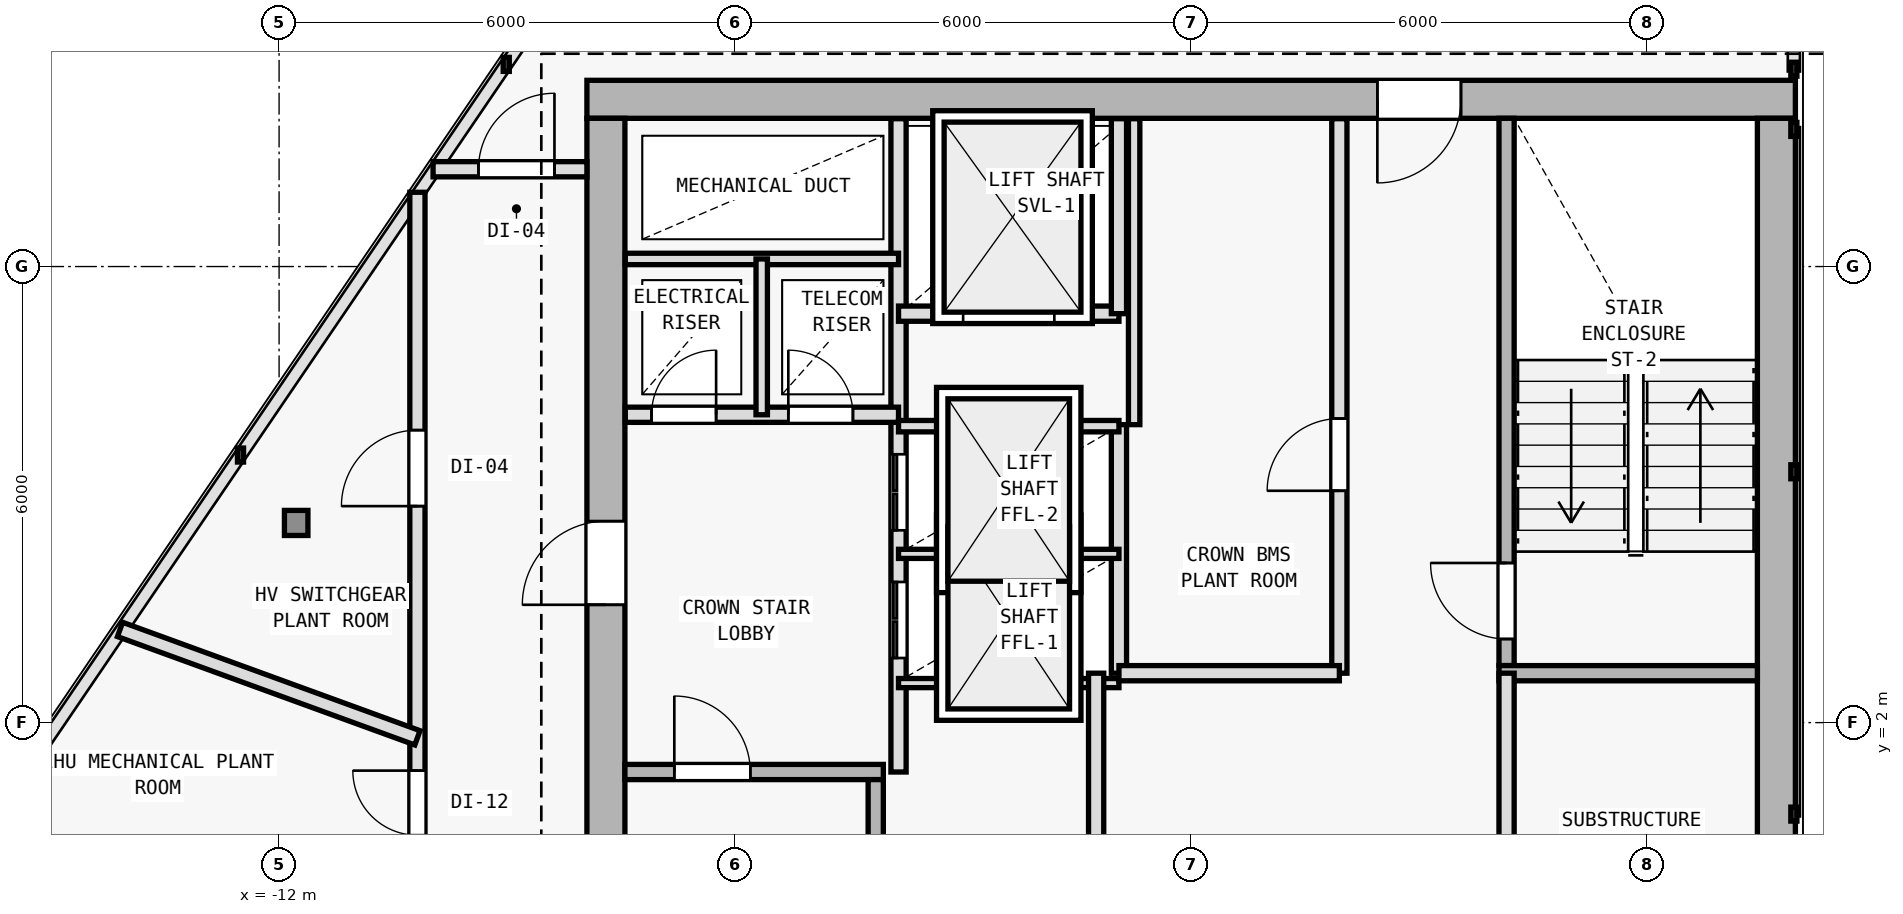
"""IFC4 building model, lengths in metres.
Left out: names, types, materials, properties, quantities, classifications, styles, units other than length and angle.
Written with IfcOpenShell. Run it as: python <this file> out.ifc"""

import sys

from ifc_helpers import new_model, si_unit, direction, frame, frame_2d, origin, origin_2d, place, context, subcontext, project, spatial, rectangle, i_section, extrude, element, fill, save


model = new_model("IFC4")
c1 = context("Model", 3, precision=1e-05, world=origin(), true_north=direction((0.0, 1.0)))
c2 = subcontext(c1, "Body", "Model", "MODEL_VIEW")
j1 = project(units=[si_unit("LENGTHUNIT", "METRE"), si_unit("PLANEANGLEUNIT", "RADIAN")], contexts=[c1])
p1 = place(None, origin())
s1 = spatial("IfcSite", under=j1, at=p1, CompositionType="ELEMENT")
p2 = place(p1, origin())
s2 = spatial("IfcBuilding", under=s1, at=p2, CompositionType="ELEMENT")
p3 = place(p2, frame((0.0, 0.0, 304.8)))
s3 = spatial("IfcBuildingStorey", under=s2, at=p3, CompositionType="ELEMENT", Elevation=304.8)
for number, where, z_axis, x_axis in (
    (1, (7.7, 10.2, 0.0), (0.0, 0.0, 1.0), (1.0, 0.0, 0.0)),
    (2, (-7.7, 10.2, 0.0), (0.0, 0.0, 1.0), (1.0, 0.0, 0.0)),
    (3, (7.7, 0.4, 0.0), (0.0, 0.0, 1.0), (1.0, 0.0, 0.0)),
    (4, (-7.7, 2.0, 0.0), (0.0, 0.0, 1.0), (1.0, 0.0, 0.0)),
):
    element("IfcColumn", number, at=place(p3, frame(where, z_axis=z_axis, x_axis=x_axis)), inside=s3, PredefinedType="COLUMN", context=c2, shape_type="SweptSolid", body=[
        extrude(i_section(OverallWidth=0.374, OverallDepth=0.372, WebThickness=0.012, FlangeThickness=0.02, FilletRadius=0.015, at=origin_2d()), origin(), (0.0, 0.0, 1.0), 3.6),
    ])
p4 = place(p3, frame((-11.775, 4.627, 0.0), z_axis=(0.0, 0.0, 1.0), x_axis=(1.0, 0.0, 0.0)))
e5 = element("IfcColumn", 5, at=p4, inside=s3, PredefinedType="COLUMN", context=c2, shape_type="SweptSolid", body=[
    extrude(i_section(OverallWidth=0.309, OverallDepth=0.33, WebThickness=0.011, FlangeThickness=0.019, FilletRadius=0.027, at=origin_2d()), origin(), (0.0, 0.0, 1.0), 3.6),
])
p5 = place(p3, frame((7.95, 10.2, 0.0), z_axis=(0.0, 0.0, 1.0), x_axis=(-1.0, 0.0, 0.0)))
e6 = element("IfcWall", 6, at=p5, inside=s3, PredefinedType="SHEAR", context=c2, shape_type="SweptSolid", body=[
    extrude(rectangle(XDim=15.9, YDim=0.5, at=frame_2d((7.95, 0.0))), origin(), (0.0, 0.0, 1.0), 3.34),
])
p6 = place(p5, frame((4.4, 0.0, 0.0)))
e7 = element("IfcOpeningElement", 7, at=p6, cuts=e6, PredefinedType="OPENING", context=c2, shape_type="SweptSolid", body=[
    extrude(rectangle(XDim=1.1, YDim=2.15, at=frame_2d((0.55, 1.075))), frame((0.0, 0.26, 0.0), z_axis=(0.0, -1.0, 0.0), x_axis=(1.0, 0.0, 0.0)), (0.0, 0.0, 1.0), 0.52),
])
p7 = place(p3, frame((-7.7, -9.15, 0.0), z_axis=(0.0, 0.0, 1.0), x_axis=(0.0, 1.0, 0.0)))
e8 = element("IfcWall", 8, at=p7, inside=s3, PredefinedType="SHEAR", context=c2, shape_type="SweptSolid", body=[
    extrude(rectangle(XDim=19.1, YDim=0.5, at=frame_2d((9.55, 0.0))), origin(), (0.0, 0.0, 1.0), 3.34),
])
p8 = place(p7, frame((12.7, 0.0, 0.0)))
e9 = element("IfcOpeningElement", 9, at=p8, cuts=e8, PredefinedType="OPENING", context=c2, shape_type="SweptSolid", body=[
    extrude(rectangle(XDim=1.1, YDim=2.15, at=frame_2d((0.55, 1.075))), frame((0.0, 0.26, 0.0), z_axis=(0.0, -1.0, 0.0), x_axis=(1.0, 0.0, 0.0)), (0.0, 0.0, 1.0), 0.52),
])
p9 = place(p3, frame((7.7, 9.95, 0.0), z_axis=(0.0, 0.0, 1.0), x_axis=(0.0, -1.0, 0.0)))
e10 = element("IfcWall", 10, at=p9, inside=s3, PredefinedType="SHEAR", context=c2, shape_type="SweptSolid", body=[
    extrude(rectangle(XDim=19.1, YDim=0.5, at=frame_2d((9.55, 0.0))), origin(), (0.0, 0.0, 1.0), 3.34),
])
p10 = place(p3, frame((-7.45, 1.35, 0.0), z_axis=(0.0, 0.0, 1.0), x_axis=(1.0, 0.0, 0.0)))
e11 = element("IfcWall", 11, at=p10, inside=s3, PredefinedType="SOLIDWALL", context=c2, shape_type="SweptSolid", body=[
    extrude(rectangle(XDim=3.4, YDim=0.2, at=frame_2d((1.7, 0.0))), origin(), (0.0, 0.0, 1.0), 3.34),
])
p11 = place(p10, frame((0.65, 0.0, 0.0)))
e12 = element("IfcOpeningElement", 12, at=p11, cuts=e11, PredefinedType="OPENING", context=c2, shape_type="SweptSolid", body=[
    extrude(rectangle(XDim=1.0, YDim=2.15, at=frame_2d((0.5, 1.075))), frame((0.0, 0.11, 0.0), z_axis=(0.0, -1.0, 0.0), x_axis=(1.0, 0.0, 0.0)), (0.0, 0.0, 1.0), 0.22),
])
p12 = place(p3, frame((-4.15, -5.95, 0.0), z_axis=(0.0, 0.0, 1.0), x_axis=(0.0, 1.0, 0.0)))
e13 = element("IfcWall", 13, at=p12, inside=s3, PredefinedType="SOLIDWALL", context=c2, shape_type="SweptSolid", body=[
    extrude(rectangle(XDim=7.2, YDim=0.2, at=frame_2d((3.6, 0.0))), origin(), (0.0, 0.0, 1.0), 3.34),
])
p13 = place(p3, frame((-3.85, 1.35, 0.0), z_axis=(0.0, 0.0, 1.0), x_axis=(0.0, 1.0, 0.0)))
e14 = element("IfcWall", 14, at=p13, inside=s3, PredefinedType="SOLIDWALL", context=c2, shape_type="SweptSolid", body=[
    extrude(rectangle(XDim=8.595, YDim=0.2, at=frame_2d((4.297, 0.0))), origin(), (0.0, 0.0, 1.0), 3.34),
])
p14 = place(p13, frame((1.5, 0.0, 0.0)))
e15 = element("IfcOpeningElement", 15, at=p14, cuts=e14, PredefinedType="OPENING", context=c2, shape_type="SweptSolid", body=[
    extrude(rectangle(XDim=1.0, YDim=2.15, at=frame_2d((0.5, 1.075))), frame((0.0, 0.11, 0.0), z_axis=(0.0, -1.0, 0.0), x_axis=(1.0, 0.0, 0.0)), (0.0, 0.0, 1.0), 0.22),
])
p15 = place(p13, frame((3.18, 0.0, 0.0)))
e16 = element("IfcOpeningElement", 16, at=p15, cuts=e14, PredefinedType="OPENING", context=c2, shape_type="SweptSolid", body=[
    extrude(rectangle(XDim=1.0, YDim=2.15, at=frame_2d((0.5, 1.075))), frame((0.0, 0.11, 0.0), z_axis=(0.0, -1.0, 0.0), x_axis=(1.0, 0.0, 0.0)), (0.0, 0.0, 1.0), 0.22),
])
p16 = place(p3, frame((-7.445, 6.05, 0.0), z_axis=(0.0, 0.0, 1.0), x_axis=(1.0, 0.0, 0.0)))
e17 = element("IfcWall", 17, at=p16, inside=s3, PredefinedType="SOLIDWALL", context=c2, shape_type="SweptSolid", body=[
    extrude(rectangle(XDim=3.595, YDim=0.2, at=frame_2d((1.797, 0.0))), origin(), (0.0, 0.0, 1.0), 3.34),
])
p17 = place(p16, frame((0.345, 0.0, 0.0)))
e18 = element("IfcOpeningElement", 18, at=p17, cuts=e17, PredefinedType="OPENING", context=c2, shape_type="SweptSolid", body=[
    extrude(rectangle(XDim=0.85, YDim=2.1, at=frame_2d((0.425, 1.05))), frame((0.0, 0.11, 0.0), z_axis=(0.0, -1.0, 0.0), x_axis=(1.0, 0.0, 0.0)), (0.0, 0.0, 1.0), 0.22),
])
p18 = place(p16, frame((2.145, 0.0, 0.0)))
e19 = element("IfcOpeningElement", 19, at=p18, cuts=e17, PredefinedType="OPENING", context=c2, shape_type="SweptSolid", body=[
    extrude(rectangle(XDim=0.85, YDim=2.1, at=frame_2d((0.425, 1.05))), frame((0.0, 0.11, 0.0), z_axis=(0.0, -1.0, 0.0), x_axis=(1.0, 0.0, 0.0)), (0.0, 0.0, 1.0), 0.22),
])
p19 = place(p3, frame((-7.445, 8.1, 0.0), z_axis=(0.0, 0.0, 1.0), x_axis=(1.0, 0.0, 0.0)))
e20 = element("IfcWall", 20, at=p19, inside=s3, PredefinedType="PARTITIONING", context=c2, shape_type="SweptSolid", body=[
    extrude(rectangle(XDim=3.595, YDim=0.15, at=frame_2d((1.797, 0.0))), origin(), (0.0, 0.0, 1.0), 3.34),
])
p20 = place(p3, frame((-5.65, 6.05, 0.0), z_axis=(0.0, 0.0, 1.0), x_axis=(0.0, 1.0, 0.0)))
e21 = element("IfcWall", 21, at=p20, inside=s3, PredefinedType="PARTITIONING", context=c2, shape_type="SweptSolid", body=[
    extrude(rectangle(XDim=2.05, YDim=0.15, at=frame_2d((1.025, 0.0))), origin(), (0.0, 0.0, 1.0), 3.34),
])
p21 = place(p3, frame((4.15, 2.75, 0.0), z_axis=(0.0, 0.0, 1.0), x_axis=(0.0, 1.0, 0.0)))
e22 = element("IfcWall", 22, at=p21, inside=s3, PredefinedType="SOLIDWALL", context=c2, shape_type="SweptSolid", body=[
    extrude(rectangle(XDim=7.2, YDim=0.2, at=frame_2d((3.6, 0.0))), origin(), (0.0, 0.0, 1.0), 3.34),
])
p22 = place(p21, frame((0.35, 0.0, 0.0)))
e23 = element("IfcOpeningElement", 23, at=p22, cuts=e22, PredefinedType="OPENING", context=c2, shape_type="SweptSolid", body=[
    extrude(rectangle(XDim=1.0, YDim=2.15, at=frame_2d((0.5, 1.075))), frame((0.0, 0.11, 0.0), z_axis=(0.0, -1.0, 0.0), x_axis=(1.0, 0.0, 0.0)), (0.0, 0.0, 1.0), 0.22),
])
p23 = place(p3, frame((4.05, 2.65, 0.0), z_axis=(0.0, 0.0, 1.0), x_axis=(1.0, 0.0, 0.0)))
e24 = element("IfcWall", 24, at=p23, inside=s3, PredefinedType="SOLIDWALL", context=c2, shape_type="SweptSolid", body=[
    extrude(rectangle(XDim=3.4, YDim=0.2, at=frame_2d((1.7, 0.0))), origin(), (0.0, 0.0, 1.0), 3.34),
])
p24 = place(p3, frame((-0.95, 2.65, 0.0), z_axis=(0.0, 0.0, 1.0), x_axis=(0.0, 1.0, 0.0)))
e25 = element("IfcWall", 25, at=p24, inside=s3, PredefinedType="SOLIDWALL", context=c2, shape_type="SweptSolid", body=[
    extrude(rectangle(XDim=3.27, YDim=0.2, at=frame_2d((1.635, 0.0))), origin(), (0.0, 0.0, 1.0), 3.34),
])
for number, where, z_axis, x_axis in (
    (26, (-3.85, 2.52, 0.0), (0.0, 0.0, 1.0), (1.0, 0.0, 0.0)),
    (27, (-3.85, 4.22, 0.0), (0.0, 0.0, 1.0), (1.0, 0.0, 0.0)),
):
    element("IfcWall", number, at=place(p3, frame(where, z_axis=z_axis, x_axis=x_axis)), inside=s3, PredefinedType="PARTITIONING", context=c2, shape_type="SweptSolid", body=[
        extrude(rectangle(XDim=2.9, YDim=0.12, at=frame_2d((1.45, 0.0))), origin(), (0.0, 0.0, 1.0), 3.34),
    ])
p25 = place(p3, frame((-3.85, 5.9, 0.0), z_axis=(0.0, 0.0, 1.0), x_axis=(1.0, 0.0, 0.0)))
e28 = element("IfcWall", 28, at=p25, inside=s3, PredefinedType="PARTITIONING", context=c2, shape_type="SweptSolid", body=[
    extrude(rectangle(XDim=2.9, YDim=0.15, at=frame_2d((1.45, 0.0))), origin(), (0.0, 0.0, 1.0), 3.34),
])
p26 = place(p3, frame((-3.85, 7.38, 0.0), z_axis=(0.0, 0.0, 1.0), x_axis=(1.0, 0.0, 0.0)))
e29 = element("IfcWall", 29, at=p26, inside=s3, PredefinedType="SOLIDWALL", context=c2, shape_type="SweptSolid", body=[
    extrude(rectangle(XDim=2.9, YDim=0.2, at=frame_2d((1.45, 0.0))), origin(), (0.0, 0.0, 1.0), 3.34),
])
p27 = place(p26, frame((0.85, 0.0, 0.0)))
e30 = element("IfcOpeningElement", 30, at=p27, cuts=e29, PredefinedType="OPENING", context=c2, shape_type="SweptSolid", body=[
    extrude(rectangle(XDim=1.2, YDim=2.2, at=frame_2d((0.6, 1.1))), frame((0.0, 0.11, 0.0), z_axis=(0.0, -1.0, 0.0), x_axis=(1.0, 0.0, 0.0)), (0.0, 0.0, 1.0), 0.22),
])
p28 = place(p3, frame((-0.95, 7.38, 0.0), z_axis=(0.0, 0.0, 1.0), x_axis=(0.0, 1.0, 0.0)))
e31 = element("IfcWall", 31, at=p28, inside=s3, PredefinedType="SOLIDWALL", context=c2, shape_type="SweptSolid", body=[
    extrude(rectangle(XDim=2.565, YDim=0.2, at=frame_2d((1.283, 0.0))), origin(), (0.0, 0.0, 1.0), 3.34),
])
p29 = place(p3, frame((4.15, -6.05, 0.0), z_axis=(0.0, 0.0, 1.0), x_axis=(0.0, 1.0, 0.0)))
e32 = element("IfcWall", 32, at=p29, inside=s3, PredefinedType="SOLIDWALL", context=c2, shape_type="SweptSolid", body=[
    extrude(rectangle(XDim=8.7, YDim=0.2, at=frame_2d((4.35, 0.0))), origin(), (0.0, 0.0, 1.0), 3.34),
])
p30 = place(p29, frame((3.6, 0.0, 0.0)))
e33 = element("IfcOpeningElement", 33, at=p30, cuts=e32, PredefinedType="OPENING", context=c2, shape_type="SweptSolid", body=[
    extrude(rectangle(XDim=0.95, YDim=2.1, at=frame_2d((0.475, 1.05))), frame((0.0, 0.11, 0.0), z_axis=(0.0, -1.0, 0.0), x_axis=(1.0, 0.0, 0.0)), (0.0, 0.0, 1.0), 0.22),
])
p31 = place(p3, frame((-1.25, -6.05, 0.0), z_axis=(0.0, 0.0, 1.0), x_axis=(0.0, 1.0, 0.0)))
e34 = element("IfcWall", 34, at=p31, inside=s3, PredefinedType="SOLIDWALL", context=c2, shape_type="SweptSolid", body=[
    extrude(rectangle(XDim=8.7, YDim=0.2, at=frame_2d((4.35, 0.0))), origin(), (0.0, 0.0, 1.0), 3.34),
])
p32 = place(p31, frame((3.4, 0.0, 0.0)))
e35 = element("IfcOpeningElement", 35, at=p32, cuts=e34, PredefinedType="OPENING", context=c2, shape_type="SweptSolid", body=[
    extrude(rectangle(XDim=0.95, YDim=2.1, at=frame_2d((0.475, 1.05))), frame((0.0, 0.11, 0.0), z_axis=(0.0, -1.0, 0.0), x_axis=(1.0, 0.0, 0.0)), (0.0, 0.0, 1.0), 0.22),
])
p33 = place(p3, frame((1.95, 2.65, 0.0), z_axis=(0.0, 0.0, 1.0), x_axis=(0.0, 1.0, 0.0)))
e36 = element("IfcWall", 36, at=p33, inside=s3, PredefinedType="SOLIDWALL", context=c2, shape_type="SweptSolid", body=[
    extrude(rectangle(XDim=7.295, YDim=0.2, at=frame_2d((3.647, 0.0))), origin(), (0.0, 0.0, 1.0), 3.34),
])
p34 = place(p33, frame((2.4, 0.0, 0.0)))
e37 = element("IfcOpeningElement", 37, at=p34, cuts=e36, PredefinedType="OPENING", context=c2, shape_type="SweptSolid", body=[
    extrude(rectangle(XDim=0.95, YDim=2.1, at=frame_2d((0.475, 1.05))), frame((0.0, 0.11, 0.0), z_axis=(0.0, -1.0, 0.0), x_axis=(1.0, 0.0, 0.0)), (0.0, 0.0, 1.0), 0.22),
])
p35 = place(p3, frame((-0.95, 2.65, 0.0), z_axis=(0.0, 0.0, 1.0), x_axis=(1.0, 0.0, 0.0)))
e38 = element("IfcWall", 38, at=p35, inside=s3, PredefinedType="SOLIDWALL", context=c2, shape_type="SweptSolid", body=[
    extrude(rectangle(XDim=2.9, YDim=0.2, at=frame_2d((1.45, 0.0))), origin(), (0.0, 0.0, 1.0), 3.34),
])
p36 = place(p3, frame((-0.75, 5.92, 0.0), z_axis=(0.0, 0.0, 1.0), x_axis=(0.0, 1.0, 0.0)))
e39 = element("IfcWall", 39, at=p36, inside=s3, PredefinedType="PARTITIONING", context=c2, shape_type="SweptSolid", body=[
    extrude(rectangle(XDim=4.025, YDim=0.15, at=frame_2d((2.013, 0.0))), origin(), (0.0, 0.0, 1.0), 3.34),
])
p37 = place(p3, frame((-10.18, -11.68, 0.0), z_axis=(0.0, 0.0, 1.0), x_axis=(0.0, 1.0, 0.0)))
e40 = element("IfcWall", 40, at=p37, inside=s3, PredefinedType="SOLIDWALL", context=c2, shape_type="SweptSolid", body=[
    extrude(rectangle(XDim=20.657, YDim=0.2, at=frame_2d((10.329, 0.0))), origin(), (0.0, 0.0, 1.0), 2.995),
])
p38 = place(p37, frame((10.66, 0.0, 0.0)))
e41 = element("IfcOpeningElement", 41, at=p38, cuts=e40, PredefinedType="OPENING", context=c2, shape_type="SweptSolid", body=[
    extrude(rectangle(XDim=0.85, YDim=2.1, at=frame_2d((0.425, 1.05))), frame((0.0, 0.11, 0.0), z_axis=(0.0, -1.0, 0.0), x_axis=(1.0, 0.0, 0.0)), (0.0, 0.0, 1.0), 0.22),
])
p39 = place(p37, frame((4.776, 0.0, 0.0)))
e42 = element("IfcOpeningElement", 42, at=p39, cuts=e40, PredefinedType="OPENING", context=c2, shape_type="SweptSolid", body=[
    extrude(rectangle(XDim=1.0, YDim=2.15, at=frame_2d((0.5, 1.075))), frame((0.0, 0.11, 0.0), z_axis=(0.0, -1.0, 0.0), x_axis=(1.0, 0.0, 0.0)), (0.0, 0.0, 1.0), 0.22),
])
p40 = place(p37, frame((16.528, 0.0, 0.0)))
e43 = element("IfcOpeningElement", 43, at=p40, cuts=e40, PredefinedType="OPENING", context=c2, shape_type="SweptSolid", body=[
    extrude(rectangle(XDim=1.0, YDim=2.15, at=frame_2d((0.5, 1.075))), frame((0.0, 0.11, 0.0), z_axis=(0.0, -1.0, 0.0), x_axis=(1.0, 0.0, 0.0)), (0.0, 0.0, 1.0), 0.22),
])
p41 = place(p37, frame((12.198, 0.0, 0.0)))
e44 = element("IfcOpeningElement", 44, at=p41, cuts=e40, PredefinedType="OPENING", context=c2, shape_type="SweptSolid", body=[
    extrude(rectangle(XDim=0.85, YDim=2.1, at=frame_2d((0.425, 1.05))), frame((0.0, 0.11, 0.0), z_axis=(0.0, -1.0, 0.0), x_axis=(1.0, 0.0, 0.0)), (0.0, 0.0, 1.0), 0.22),
])
p42 = place(p3, frame((-9.974, 9.28, 0.0), z_axis=(0.0, 0.0, 1.0), x_axis=(1.0, 0.0, 0.0)))
e45 = element("IfcWall", 45, at=p42, inside=s3, PredefinedType="SOLIDWALL", context=c2, shape_type="SweptSolid", body=[
    extrude(rectangle(XDim=2.024, YDim=0.2, at=frame_2d((1.012, 0.0))), origin(), (0.0, 0.0, 1.0), 3.34),
])
p43 = place(p42, frame((0.597, 0.0, 0.0)))
e46 = element("IfcOpeningElement", 46, at=p43, cuts=e45, PredefinedType="OPENING", context=c2, shape_type="SweptSolid", body=[
    extrude(rectangle(XDim=1.0, YDim=2.15, at=frame_2d((0.5, 1.075))), frame((0.0, 0.11, 0.0), z_axis=(0.0, -1.0, 0.0), x_axis=(1.0, 0.0, 0.0)), (0.0, 0.0, 1.0), 0.22),
])
p44 = place(p3, frame((-14.093, 3.226, 0.0), z_axis=(0.0, 0.0, 1.0), x_axis=(0.939579266893, -0.342331420154, 0.0)))
e47 = element("IfcWall", 47, at=p44, inside=s3, PredefinedType="SOLIDWALL", context=c2, shape_type="SweptSolid", body=[
    extrude(rectangle(XDim=4.164, YDim=0.2, at=frame_2d((2.082, 0.0))), origin(), (0.0, 0.0, 1.0), 3.34),
])
p45 = place(p8, origin())
e48 = element("IfcDoor", 48, at=p45, inside=s3, OperationType="SINGLE_SWING_LEFT", PredefinedType="DOOR", context=c2, shape_type="SweptSolid", body=[
    extrude(rectangle(XDim=1.1, YDim=2.15, at=frame_2d((0.55, 1.075))), frame((0.0, 0.025, 0.0), z_axis=(0.0, -1.0, 0.0), x_axis=(1.0, 0.0, 0.0)), (0.0, 0.0, 1.0), 0.05),
])
fill(e9, e48)
p46 = place(p6, origin())
e49 = element("IfcDoor", 49, at=p46, inside=s3, OperationType="SINGLE_SWING_RIGHT", PredefinedType="DOOR", context=c2, shape_type="SweptSolid", body=[
    extrude(rectangle(XDim=1.1, YDim=2.15, at=frame_2d((0.55, 1.075))), frame((0.0, 0.025, 0.0), z_axis=(0.0, -1.0, 0.0), x_axis=(1.0, 0.0, 0.0)), (0.0, 0.0, 1.0), 0.05),
])
fill(e7, e49)
p47 = place(p11, origin())
e50 = element("IfcDoor", 50, at=p47, inside=s3, OperationType="SINGLE_SWING_LEFT", PredefinedType="DOOR", context=c2, shape_type="SweptSolid", body=[
    extrude(rectangle(XDim=1.0, YDim=2.15, at=frame_2d((0.5, 1.075))), frame((0.0, 0.025, 0.0), z_axis=(0.0, -1.0, 0.0), x_axis=(1.0, 0.0, 0.0)), (0.0, 0.0, 1.0), 0.05),
])
fill(e12, e50)
p48 = place(p17, origin())
e51 = element("IfcDoor", 51, at=p48, inside=s3, OperationType="SINGLE_SWING_RIGHT", PredefinedType="DOOR", context=c2, shape_type="SweptSolid", body=[
    extrude(rectangle(XDim=0.85, YDim=2.1, at=frame_2d((0.425, 1.05))), frame((0.0, 0.025, 0.0), z_axis=(0.0, -1.0, 0.0), x_axis=(1.0, 0.0, 0.0)), (0.0, 0.0, 1.0), 0.05),
])
fill(e18, e51)
p49 = place(p18, origin())
e52 = element("IfcDoor", 52, at=p49, inside=s3, OperationType="SINGLE_SWING_LEFT", PredefinedType="DOOR", context=c2, shape_type="SweptSolid", body=[
    extrude(rectangle(XDim=0.85, YDim=2.1, at=frame_2d((0.425, 1.05))), frame((0.0, 0.025, 0.0), z_axis=(0.0, -1.0, 0.0), x_axis=(1.0, 0.0, 0.0)), (0.0, 0.0, 1.0), 0.05),
])
fill(e19, e52)
p50 = place(p22, origin())
e53 = element("IfcDoor", 53, at=p50, inside=s3, OperationType="SINGLE_SWING_RIGHT", PredefinedType="DOOR", context=c2, shape_type="SweptSolid", body=[
    extrude(rectangle(XDim=1.0, YDim=2.15, at=frame_2d((0.5, 1.075))), frame((0.0, 0.025, 0.0), z_axis=(0.0, -1.0, 0.0), x_axis=(1.0, 0.0, 0.0)), (0.0, 0.0, 1.0), 0.05),
])
fill(e23, e53)
p51 = place(p27, origin())
e54 = element("IfcDoor", 54, at=p51, inside=s3, OperationType="DOUBLE_DOOR_SLIDING", PredefinedType="DOOR", context=c2, shape_type="SweptSolid", body=[
    extrude(rectangle(XDim=1.2, YDim=2.2, at=frame_2d((0.6, 1.1))), frame((0.0, 0.025, 0.0), z_axis=(0.0, -1.0, 0.0), x_axis=(1.0, 0.0, 0.0)), (0.0, 0.0, 1.0), 0.05),
])
fill(e30, e54)
p52 = place(p34, origin())
e55 = element("IfcDoor", 55, at=p52, inside=s3, OperationType="SINGLE_SWING_LEFT", PredefinedType="DOOR", context=c2, shape_type="SweptSolid", body=[
    extrude(rectangle(XDim=0.95, YDim=2.1, at=frame_2d((0.475, 1.05))), frame((0.0, 0.025, 0.0), z_axis=(0.0, -1.0, 0.0), x_axis=(1.0, 0.0, 0.0)), (0.0, 0.0, 1.0), 0.05),
])
fill(e37, e55)
p53 = place(p14, origin())
e56 = element("IfcDoor", 56, at=p53, inside=s3, OperationType="DOUBLE_DOOR_SLIDING", PredefinedType="DOOR", context=c2, shape_type="SweptSolid", body=[
    extrude(rectangle(XDim=1.0, YDim=2.15, at=frame_2d((0.5, 1.075))), frame((0.0, 0.025, 0.0), z_axis=(0.0, -1.0, 0.0), x_axis=(1.0, 0.0, 0.0)), (0.0, 0.0, 1.0), 0.05),
])
fill(e15, e56)
p54 = place(p15, origin())
e57 = element("IfcDoor", 57, at=p54, inside=s3, OperationType="DOUBLE_DOOR_SLIDING", PredefinedType="DOOR", context=c2, shape_type="SweptSolid", body=[
    extrude(rectangle(XDim=1.0, YDim=2.15, at=frame_2d((0.5, 1.075))), frame((0.0, 0.025, 0.0), z_axis=(0.0, -1.0, 0.0), x_axis=(1.0, 0.0, 0.0)), (0.0, 0.0, 1.0), 0.05),
])
fill(e16, e57)
p55 = place(p43, origin())
e58 = element("IfcDoor", 58, at=p55, inside=s3, OperationType="SINGLE_SWING_RIGHT", PredefinedType="DOOR", context=c2, shape_type="SweptSolid", body=[
    extrude(rectangle(XDim=1.0, YDim=2.15, at=frame_2d((0.5, 1.075))), frame((0.0, 0.025, 0.0), z_axis=(0.0, -1.0, 0.0), x_axis=(1.0, 0.0, 0.0)), (0.0, 0.0, 1.0), 0.05),
])
fill(e46, e58)
p56 = place(p40, origin())
e59 = element("IfcDoor", 59, at=p56, inside=s3, OperationType="SINGLE_SWING_LEFT", PredefinedType="DOOR", context=c2, shape_type="SweptSolid", body=[
    extrude(rectangle(XDim=1.0, YDim=2.15, at=frame_2d((0.5, 1.075))), frame((0.0, 0.025, 0.0), z_axis=(0.0, -1.0, 0.0), x_axis=(1.0, 0.0, 0.0)), (0.0, 0.0, 1.0), 0.05),
])
fill(e43, e59)
p57 = place(p41, origin())
e60 = element("IfcDoor", 60, at=p57, inside=s3, OperationType="SINGLE_SWING_RIGHT", PredefinedType="DOOR", context=c2, shape_type="SweptSolid", body=[
    extrude(rectangle(XDim=0.85, YDim=2.1, at=frame_2d((0.425, 1.05))), frame((0.0, 0.025, 0.0), z_axis=(0.0, -1.0, 0.0), x_axis=(1.0, 0.0, 0.0)), (0.0, 0.0, 1.0), 0.05),
])
fill(e44, e60)
save(model, sys.argv[1])
